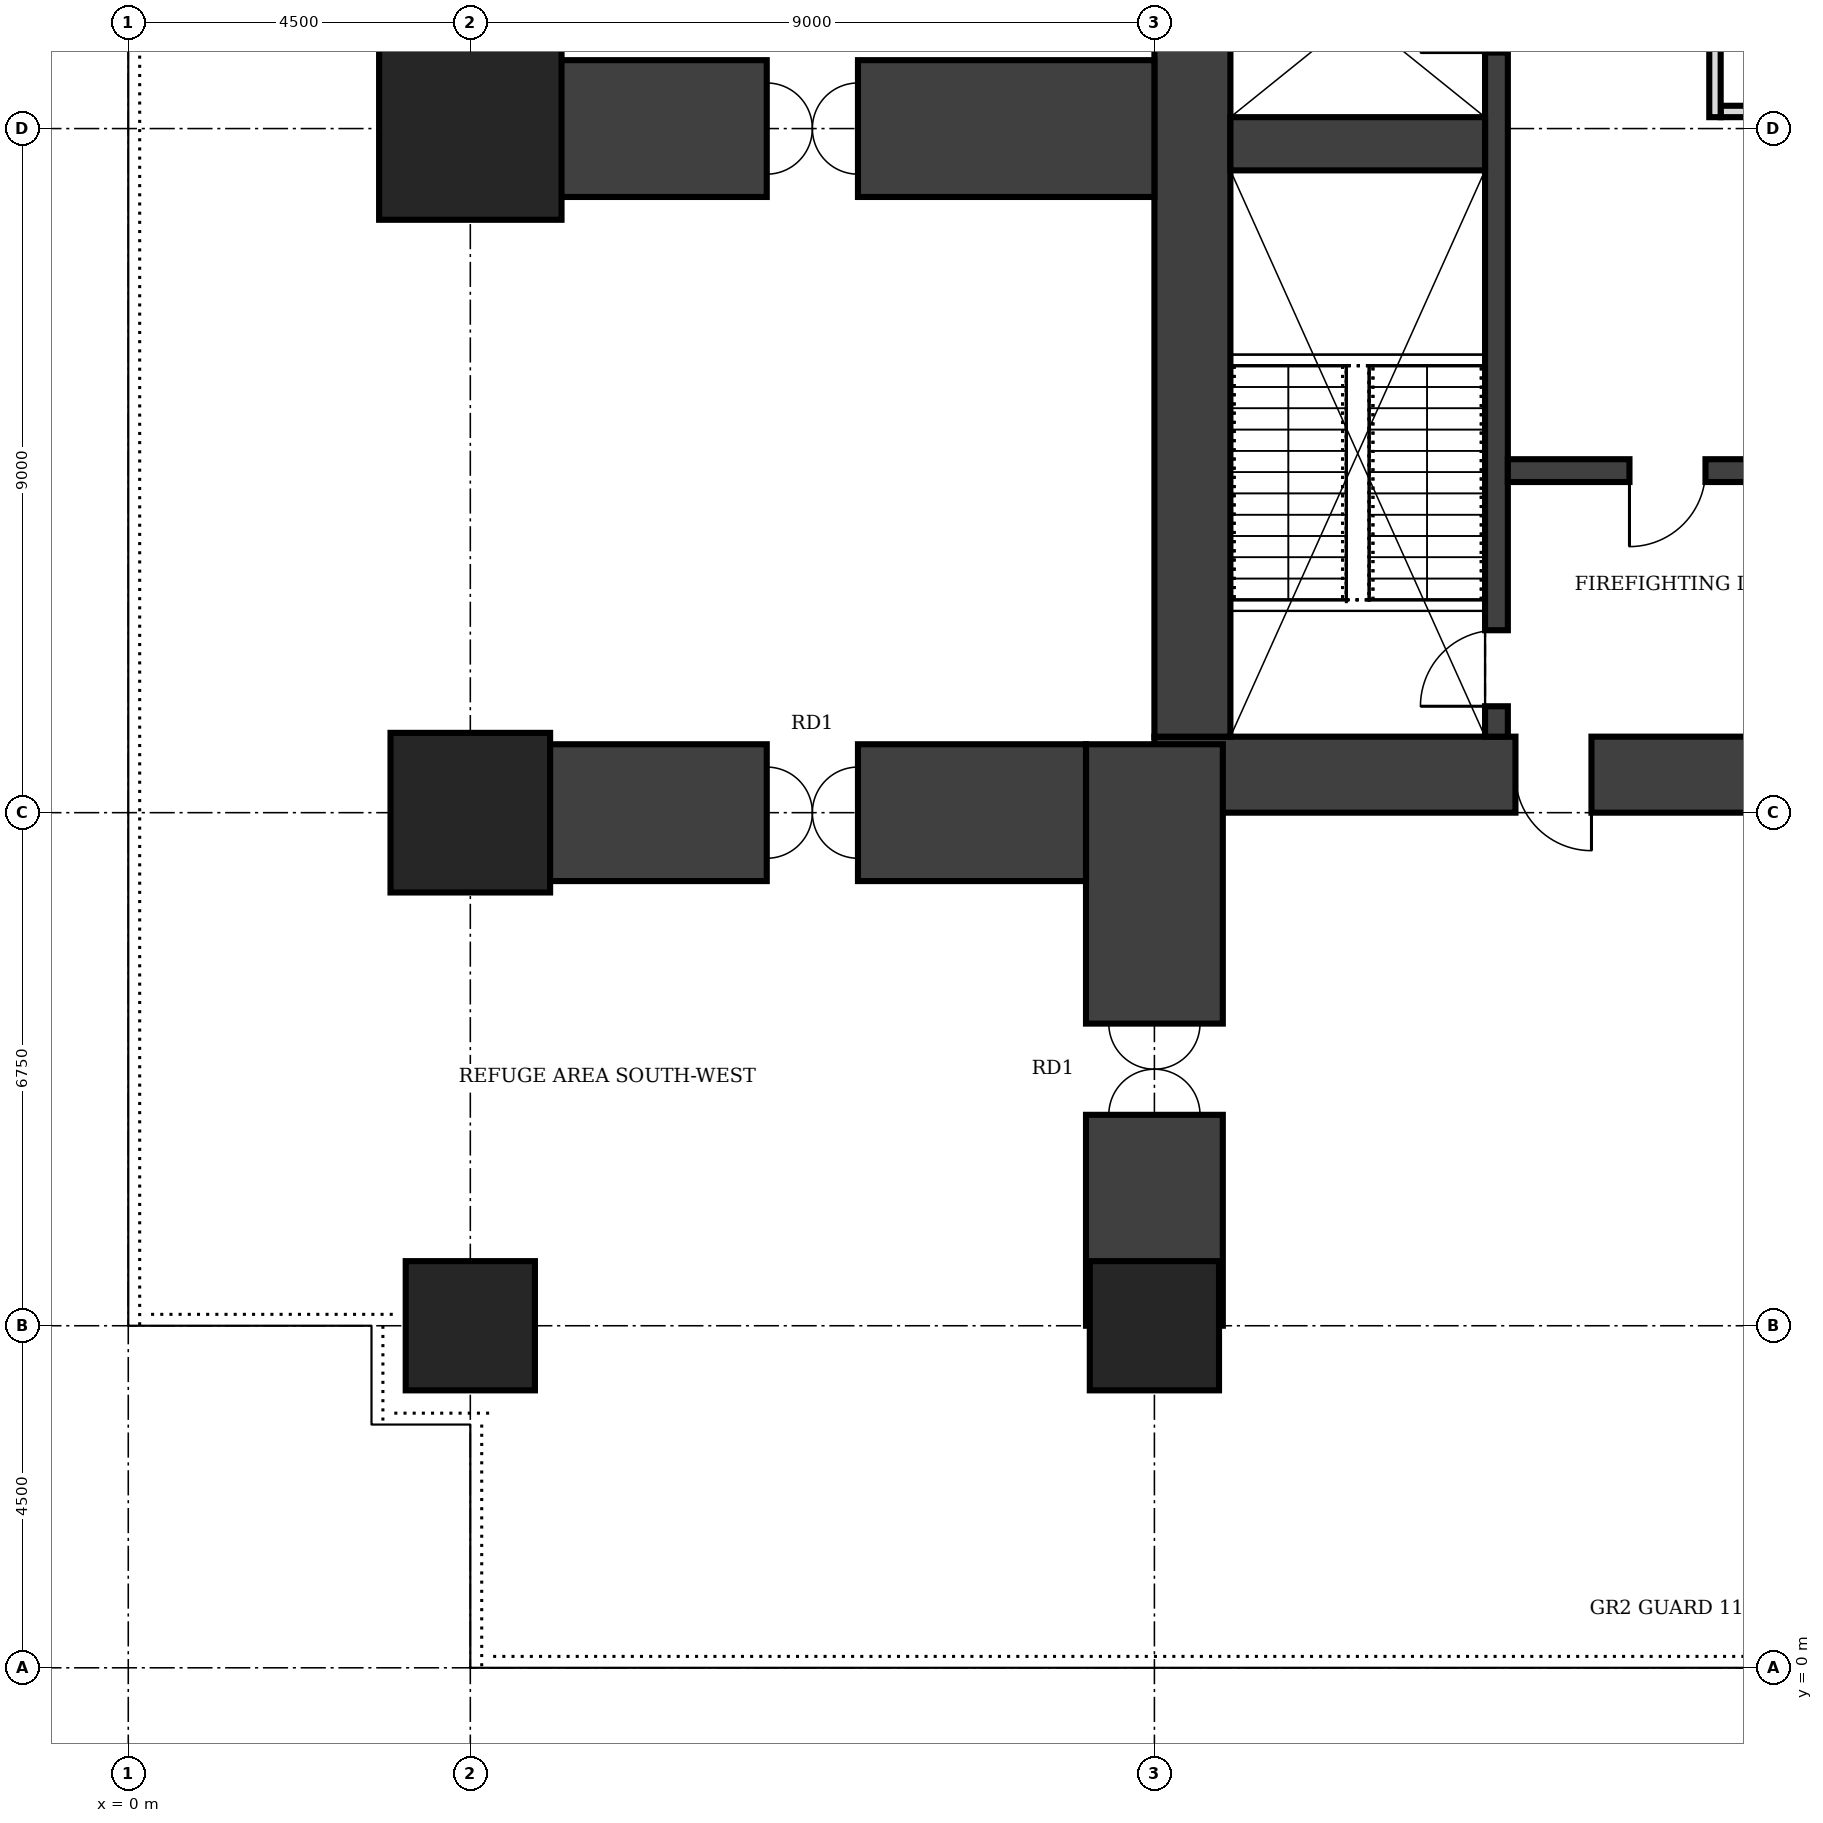
"""IFC4 building model, lengths in metres.
Left out: names, types, materials, properties, quantities, classifications, styles, units other than length and angle.
Written with IfcOpenShell. Run it as: python <this file> out.ifc"""

import sys

from ifc_helpers import new_model, si_unit, direction, frame, frame_2d, origin, origin_2d, place, context, subcontext, project, spatial, rectangle, extrude, element, fill, save


model = new_model("IFC4")
c1 = context("Model", 3, precision=1e-05, world=origin(), true_north=direction((0.0, 1.0)))
c2 = subcontext(c1, "Body", "Model", "MODEL_VIEW")
j1 = project(units=[si_unit("LENGTHUNIT", "METRE"), si_unit("PLANEANGLEUNIT", "RADIAN")], contexts=[c1])
p1 = place(None, origin())
s1 = spatial("IfcSite", under=j1, at=p1, CompositionType="ELEMENT")
p2 = place(p1, origin())
s2 = spatial("IfcBuilding", under=s1, at=p2, CompositionType="ELEMENT")
p3 = place(p2, frame((0.0, 0.0, 169.0)))
s3 = spatial("IfcBuildingStorey", under=s2, at=p3, CompositionType="ELEMENT", Elevation=169.0)
p4 = place(p3, frame((13.5, 11.75, 0.0), z_axis=(0.0, 0.0, 1.0), x_axis=(1.0, 0.0, 0.0)))
e1 = element("IfcWall", 1, at=p4, inside=s3, PredefinedType="SHEAR", context=c2, shape_type="SweptSolid", body=[
    extrude(rectangle(XDim=13.5, YDim=1.0, at=frame_2d((6.75, 0.0))), origin(), (0.0, 0.0, 1.0), 8.0),
])
p5 = place(p4, frame((4.75, 0.0, 0.0)))
e2 = element("IfcOpeningElement", 2, at=p5, cuts=e1, PredefinedType="OPENING", context=c2, shape_type="SweptSolid", body=[
    extrude(rectangle(XDim=1.0, YDim=2.1, at=frame_2d((0.5, 1.05))), frame((0.0, 0.51, 0.0), z_axis=(0.0, -1.0, 0.0), x_axis=(1.0, 0.0, 0.0)), (0.0, 0.0, 1.0), 1.02),
])
p6 = place(p3, frame((14.0, 28.25, 0.0), z_axis=(0.0, 0.0, 1.0), x_axis=(0.0, -1.0, 0.0)))
e3 = element("IfcWall", 3, at=p6, inside=s3, PredefinedType="SHEAR", context=c2, shape_type="SweptSolid", body=[
    extrude(rectangle(XDim=16.0, YDim=1.0, at=frame_2d((8.0, 0.0))), origin(), (0.0, 0.0, 1.0), 8.0),
])
p7 = place(p3, frame((18.0, 12.25, 0.0), z_axis=(0.0, 0.0, 1.0), x_axis=(0.0, 1.0, 0.0)))
e4 = element("IfcWall", 4, at=p7, inside=s3, PredefinedType="SHEAR", context=c2, shape_type="SweptSolid", body=[
    extrude(rectangle(XDim=16.0, YDim=0.3, at=frame_2d((8.0, 0.0))), origin(), (0.0, 0.0, 1.0), 8.0),
])
p8 = place(p7, frame((0.4, 0.0, 0.0)))
e5 = element("IfcOpeningElement", 5, at=p8, cuts=e4, PredefinedType="OPENING", context=c2, shape_type="SweptSolid", body=[
    extrude(rectangle(XDim=1.0, YDim=2.1, at=frame_2d((0.5, 1.05))), frame((0.0, 0.16, 0.0), z_axis=(0.0, -1.0, 0.0), x_axis=(1.0, 0.0, 0.0)), (0.0, 0.0, 1.0), 0.32),
])
p9 = place(p7, frame((14.525, 0.0, 0.0)))
e6 = element("IfcOpeningElement", 6, at=p9, cuts=e4, PredefinedType="OPENING", context=c2, shape_type="SweptSolid", body=[
    extrude(rectangle(XDim=1.1, YDim=2.1, at=frame_2d((0.55, 1.05))), frame((0.0, 0.16, 0.0), z_axis=(0.0, -1.0, 0.0), x_axis=(1.0, 0.0, 0.0)), (0.0, 0.0, 1.0), 0.32),
])
p10 = place(p7, frame((9.0, 0.0, 0.0)))
e7 = element("IfcOpeningElement", 7, at=p10, cuts=e4, PredefinedType="OPENING", context=c2, shape_type="SweptSolid", body=[
    extrude(rectangle(XDim=1.0, YDim=2.1, at=frame_2d((0.5, 1.05))), frame((0.0, 0.16, 0.0), z_axis=(0.0, -1.0, 0.0), x_axis=(1.0, 0.0, 0.0)), (0.0, 0.0, 1.0), 0.32),
])
p11 = place(p7, frame((12.0, 0.0, 0.0)))
e8 = element("IfcOpeningElement", 8, at=p11, cuts=e4, PredefinedType="OPENING", context=c2, shape_type="SweptSolid", body=[
    extrude(rectangle(XDim=1.0, YDim=2.1, at=frame_2d((0.5, 1.05))), frame((0.0, 0.16, 0.0), z_axis=(0.0, -1.0, 0.0), x_axis=(1.0, 0.0, 0.0)), (0.0, 0.0, 1.0), 0.32),
])
p12 = place(p3, frame((14.5, 20.05, 0.0), z_axis=(0.0, 0.0, 1.0), x_axis=(1.0, 0.0, 0.0)))
e9 = element("IfcWall", 9, at=p12, inside=s3, PredefinedType="SHEAR", context=c2, shape_type="SweptSolid", body=[
    extrude(rectangle(XDim=3.35, YDim=0.7, at=frame_2d((1.675, 0.0))), origin(), (0.0, 0.0, 1.0), 8.0),
])
p13 = place(p3, frame((18.15, 15.75, 0.0), z_axis=(0.0, 0.0, 1.0), x_axis=(1.0, 0.0, 0.0)))
e10 = element("IfcWall", 10, at=p13, inside=s3, PredefinedType="SHEAR", context=c2, shape_type="SweptSolid", body=[
    extrude(rectangle(XDim=4.2, YDim=0.3, at=frame_2d((2.1, 0.0))), origin(), (0.0, 0.0, 1.0), 8.0),
])
p14 = place(p13, frame((1.6, 0.0, 0.0)))
e11 = element("IfcOpeningElement", 11, at=p14, cuts=e10, PredefinedType="OPENING", context=c2, shape_type="SweptSolid", body=[
    extrude(rectangle(XDim=1.0, YDim=2.1, at=frame_2d((0.5, 1.05))), frame((0.0, 0.16, 0.0), z_axis=(0.0, -1.0, 0.0), x_axis=(1.0, 0.0, 0.0)), (0.0, 0.0, 1.0), 0.32),
])
for number, where, z_axis, x_axis in (
    (12, (4.5, 4.5, 0.0), (0.0, 0.0, 1.0), (1.0, 0.0, 0.0)),
    (13, (13.5, 4.5, 0.0), (0.0, 0.0, 1.0), (1.0, 0.0, 0.0)),
):
    element("IfcColumn", number, at=place(p3, frame(where, z_axis=z_axis, x_axis=x_axis)), inside=s3, PredefinedType="COLUMN", context=c2, shape_type="SweptSolid", body=[
        extrude(rectangle(XDim=1.7, YDim=1.7, at=origin_2d()), origin(), (0.0, 0.0, 1.0), 8.0),
    ])
p15 = place(p3, frame((4.5, 11.25, 0.0), z_axis=(0.0, 0.0, 1.0), x_axis=(1.0, 0.0, 0.0)))
e14 = element("IfcColumn", 14, at=p15, inside=s3, PredefinedType="COLUMN", context=c2, shape_type="SweptSolid", body=[
    extrude(rectangle(XDim=2.1, YDim=2.1, at=origin_2d()), origin(), (0.0, 0.0, 1.0), 8.0),
])
p16 = place(p3, frame((4.5, 20.25, 0.0), z_axis=(0.0, 0.0, 1.0), x_axis=(1.0, 0.0, 0.0)))
e15 = element("IfcColumn", 15, at=p16, inside=s3, PredefinedType="COLUMN", context=c2, shape_type="SweptSolid", body=[
    extrude(rectangle(XDim=2.4, YDim=2.4, at=origin_2d()), origin(), (0.0, 0.0, 1.0), 8.0),
])
p17 = place(p3, frame((13.5, 4.5, 0.0), z_axis=(0.0, 0.0, 1.0), x_axis=(0.0, 1.0, 0.0)))
e16 = element("IfcWall", 16, at=p17, inside=s3, PredefinedType="SHEAR", context=c2, shape_type="SweptSolid", body=[
    extrude(rectangle(XDim=7.65, YDim=1.8, at=frame_2d((3.825, 0.0))), origin(), (0.0, 0.0, 1.0), 8.0),
])
p18 = place(p17, frame((2.775, 0.0, 0.0)))
e17 = element("IfcOpeningElement", 17, at=p18, cuts=e16, PredefinedType="OPENING", context=c2, shape_type="SweptSolid", body=[
    extrude(rectangle(XDim=1.2, YDim=2.1, at=frame_2d((0.6, 1.05))), frame((0.0, 0.91, 0.0), z_axis=(0.0, -1.0, 0.0), x_axis=(1.0, 0.0, 0.0)), (0.0, 0.0, 1.0), 1.82),
])
p19 = place(p3, frame((4.5, 20.25, 0.0), z_axis=(0.0, 0.0, 1.0), x_axis=(1.0, 0.0, 0.0)))
e18 = element("IfcWall", 18, at=p19, inside=s3, PredefinedType="SHEAR", context=c2, shape_type="SweptSolid", body=[
    extrude(rectangle(XDim=9.0, YDim=1.8, at=frame_2d((4.5, 0.0))), origin(), (0.0, 0.0, 1.0), 8.0),
])
p20 = place(p19, frame((3.9, 0.0, 0.0)))
e19 = element("IfcOpeningElement", 19, at=p20, cuts=e18, PredefinedType="OPENING", context=c2, shape_type="SweptSolid", body=[
    extrude(rectangle(XDim=1.2, YDim=2.1, at=frame_2d((0.6, 1.05))), frame((0.0, 0.91, 0.0), z_axis=(0.0, -1.0, 0.0), x_axis=(1.0, 0.0, 0.0)), (0.0, 0.0, 1.0), 1.82),
])
p21 = place(p3, frame((4.5, 11.25, 0.0), z_axis=(0.0, 0.0, 1.0), x_axis=(1.0, 0.0, 0.0)))
e20 = element("IfcWall", 20, at=p21, inside=s3, PredefinedType="SHEAR", context=c2, shape_type="SweptSolid", body=[
    extrude(rectangle(XDim=8.1, YDim=1.8, at=frame_2d((4.05, 0.0))), origin(), (0.0, 0.0, 1.0), 8.0),
])
p22 = place(p21, frame((3.9, 0.0, 0.0)))
e21 = element("IfcOpeningElement", 21, at=p22, cuts=e20, PredefinedType="OPENING", context=c2, shape_type="SweptSolid", body=[
    extrude(rectangle(XDim=1.2, YDim=2.1, at=frame_2d((0.6, 1.05))), frame((0.0, 0.91, 0.0), z_axis=(0.0, -1.0, 0.0), x_axis=(1.0, 0.0, 0.0)), (0.0, 0.0, 1.0), 1.82),
])
p23 = place(p3, frame((20.875, 20.4, 0.0), z_axis=(0.0, 0.0, 1.0), x_axis=(0.0, 1.0, 0.0)))
e22 = element("IfcWall", 22, at=p23, inside=s3, PredefinedType="PARTITIONING", context=c2, shape_type="SweptSolid", body=[
    extrude(rectangle(XDim=6.0, YDim=0.15, at=frame_2d((3.0, 0.0))), origin(), (0.0, 0.0, 1.0), 7.75),
])
p24 = place(p23, frame((2.55, 0.0, 0.0)))
e23 = element("IfcOpeningElement", 23, at=p24, cuts=e22, PredefinedType="OPENING", context=c2, shape_type="SweptSolid", body=[
    extrude(rectangle(XDim=0.9, YDim=2.1, at=frame_2d((0.45, 1.05))), frame((0.0, 0.085, 0.0), z_axis=(0.0, -1.0, 0.0), x_axis=(1.0, 0.0, 0.0)), (0.0, 0.0, 1.0), 0.17),
])
p25 = place(p3, frame((20.95, 20.475, 0.0), z_axis=(0.0, 0.0, 1.0), x_axis=(1.0, 0.0, 0.0)))
e24 = element("IfcWall", 24, at=p25, inside=s3, PredefinedType="PARTITIONING", context=c2, shape_type="SweptSolid", body=[
    extrude(rectangle(XDim=1.4, YDim=0.15, at=frame_2d((0.7, 0.0))), origin(), (0.0, 0.0, 1.0), 7.75),
])
p26 = place(p5, frame((1.0, 0.0, 0.0), z_axis=(0.0, 0.0, 1.0), x_axis=(-1.0, 0.0, 0.0)))
e25 = element("IfcDoor", 25, at=p26, inside=s3, OperationType="SINGLE_SWING_LEFT", PredefinedType="DOOR", context=c2, shape_type="SweptSolid", body=[
    extrude(rectangle(XDim=1.0, YDim=2.1, at=frame_2d((0.5, 1.05))), frame((0.0, 0.025, 0.0), z_axis=(0.0, -1.0, 0.0), x_axis=(1.0, 0.0, 0.0)), (0.0, 0.0, 1.0), 0.05),
])
fill(e2, e25)
p27 = place(p14, frame((1.0, 0.0, 0.0), z_axis=(0.0, 0.0, 1.0), x_axis=(-1.0, 0.0, 0.0)))
e26 = element("IfcDoor", 26, at=p27, inside=s3, OperationType="SINGLE_SWING_RIGHT", PredefinedType="DOOR", context=c2, shape_type="SweptSolid", body=[
    extrude(rectangle(XDim=1.0, YDim=2.1, at=frame_2d((0.5, 1.05))), frame((0.0, 0.025, 0.0), z_axis=(0.0, -1.0, 0.0), x_axis=(1.0, 0.0, 0.0)), (0.0, 0.0, 1.0), 0.05),
])
fill(e11, e26)
p28 = place(p8, origin())
e27 = element("IfcDoor", 27, at=p28, inside=s3, OperationType="SINGLE_SWING_LEFT", PredefinedType="DOOR", context=c2, shape_type="SweptSolid", body=[
    extrude(rectangle(XDim=1.0, YDim=2.1, at=frame_2d((0.5, 1.05))), frame((0.0, 0.025, 0.0), z_axis=(0.0, -1.0, 0.0), x_axis=(1.0, 0.0, 0.0)), (0.0, 0.0, 1.0), 0.05),
])
fill(e5, e27)
p29 = place(p18, origin())
e28 = element("IfcDoor", 28, at=p29, inside=s3, OperationType="DOUBLE_DOOR_DOUBLE_SWING", PredefinedType="DOOR", context=c2, shape_type="SweptSolid", body=[
    extrude(rectangle(XDim=1.2, YDim=2.1, at=frame_2d((0.6, 1.05))), frame((0.0, 0.025, 0.0), z_axis=(0.0, -1.0, 0.0), x_axis=(1.0, 0.0, 0.0)), (0.0, 0.0, 1.0), 0.05),
])
fill(e17, e28)
p30 = place(p20, origin())
e29 = element("IfcDoor", 29, at=p30, inside=s3, OperationType="DOUBLE_DOOR_DOUBLE_SWING", PredefinedType="DOOR", context=c2, shape_type="SweptSolid", body=[
    extrude(rectangle(XDim=1.2, YDim=2.1, at=frame_2d((0.6, 1.05))), frame((0.0, 0.025, 0.0), z_axis=(0.0, -1.0, 0.0), x_axis=(1.0, 0.0, 0.0)), (0.0, 0.0, 1.0), 0.05),
])
fill(e19, e29)
p31 = place(p22, origin())
e30 = element("IfcDoor", 30, at=p31, inside=s3, OperationType="DOUBLE_DOOR_DOUBLE_SWING", PredefinedType="DOOR", context=c2, shape_type="SweptSolid", body=[
    extrude(rectangle(XDim=1.2, YDim=2.1, at=frame_2d((0.6, 1.05))), frame((0.0, 0.025, 0.0), z_axis=(0.0, -1.0, 0.0), x_axis=(1.0, 0.0, 0.0)), (0.0, 0.0, 1.0), 0.05),
])
fill(e21, e30)
save(model, sys.argv[1])
